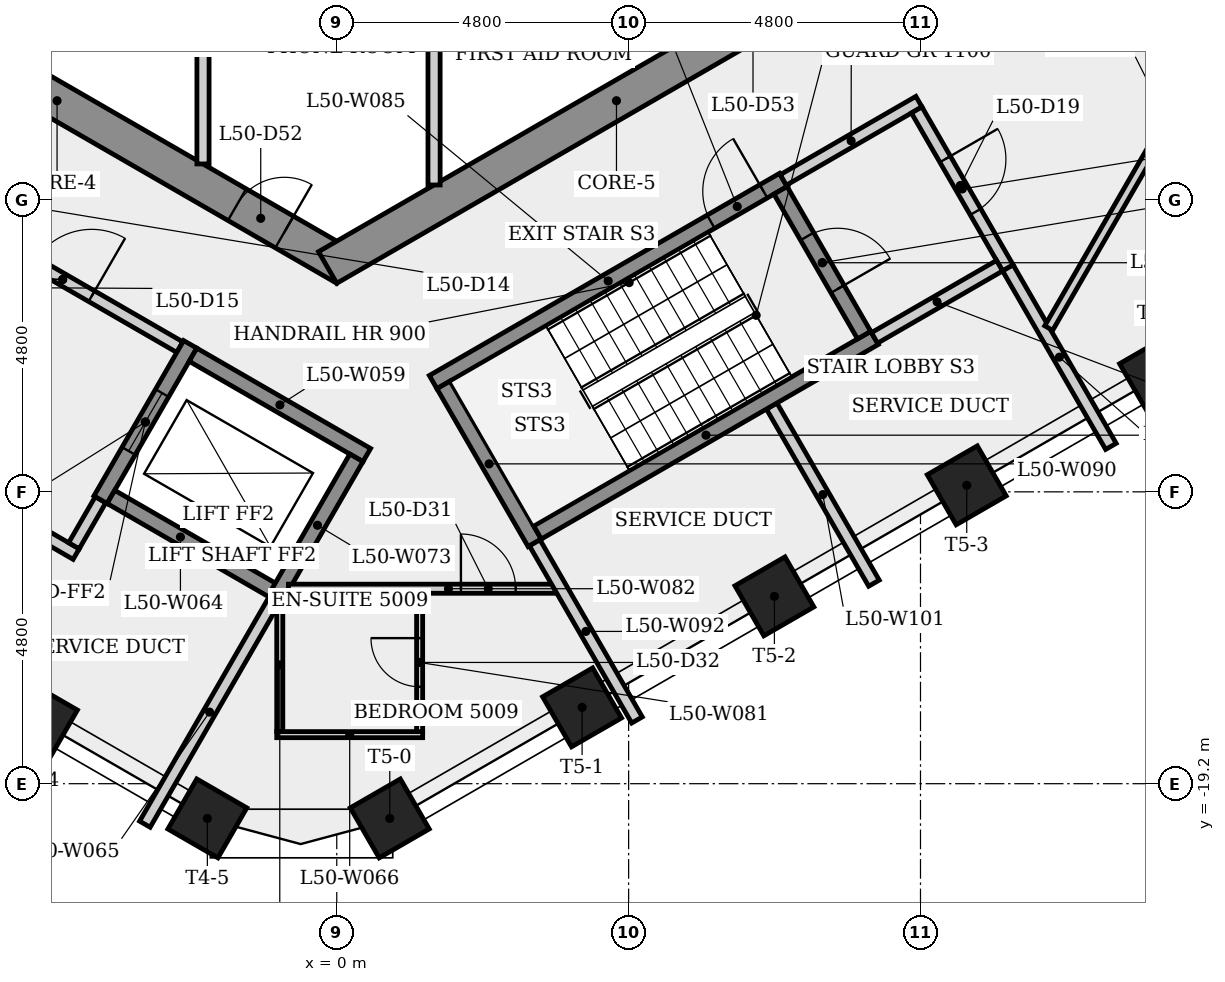
"""IFC4 building model, lengths in metres.
Left out: names, types, materials, properties, quantities, classifications, styles, units other than length and angle.
Written with IfcOpenShell. Run it as: python <this file> out.ifc"""

import sys

from ifc_helpers import new_model, si_unit, direction, frame, frame_2d, origin, origin_2d, place, context, subcontext, project, spatial, rectangle, extrude, element, fill, save


model = new_model("IFC4")
c1 = context("Model", 3, precision=1e-05, world=origin(), true_north=direction((0.0, 1.0)))
c2 = subcontext(c1, "Body", "Model", "MODEL_VIEW")
j1 = project(units=[si_unit("LENGTHUNIT", "METRE"), si_unit("PLANEANGLEUNIT", "RADIAN")], contexts=[c1])
p1 = place(None, origin())
s1 = spatial("IfcSite", under=j1, at=p1, CompositionType="ELEMENT")
p2 = place(p1, origin())
s2 = spatial("IfcBuilding", under=s1, at=p2, CompositionType="ELEMENT")
p3 = place(p2, frame((0.0, 0.0, 186.7)))
s3 = spatial("IfcBuildingStorey", under=s2, at=p3, CompositionType="ELEMENT", Elevation=186.7)
p4 = place(p3, frame((-9.35, -5.225, 0.0), z_axis=(0.0, 0.0, 1.0), x_axis=(0.866023993627, -0.500002442456, 0.0)))
e1 = element("IfcWall", 1, at=p4, inside=s3, PredefinedType="SHEAR", context=c2, shape_type="SweptSolid", body=[
    extrude(rectangle(XDim=10.97, YDim=0.6, at=frame_2d((5.485, 0.0))), origin(), (0.0, 0.0, 1.0), 4.0),
])
p5 = place(p4, frame((3.777, 0.0, 0.0)))
e2 = element("IfcOpeningElement", 2, at=p5, cuts=e1, PredefinedType="OPENING", context=c2, shape_type="SweptSolid", body=[
    extrude(rectangle(XDim=0.9, YDim=2.1, at=frame_2d((0.45, 1.05))), frame((0.0, 0.31, 0.0), z_axis=(0.0, -1.0, 0.0), x_axis=(1.0, 0.0, 0.0)), (0.0, 0.0, 1.0), 0.62),
])
p6 = place(p4, frame((8.903, 0.0, 0.0)))
e3 = element("IfcOpeningElement", 3, at=p6, cuts=e1, PredefinedType="OPENING", context=c2, shape_type="SweptSolid", body=[
    extrude(rectangle(XDim=0.9, YDim=2.1, at=frame_2d((0.45, 1.05))), frame((0.0, 0.31, 0.0), z_axis=(0.0, -1.0, 0.0), x_axis=(1.0, 0.0, 0.0)), (0.0, 0.0, 1.0), 0.62),
])
p7 = place(p3, frame((-0.15, -10.71, 0.0), z_axis=(0.0, 0.0, 1.0), x_axis=(0.866023993627, 0.500002442456, 0.0)))
e4 = element("IfcWall", 4, at=p7, inside=s3, PredefinedType="SHEAR", context=c2, shape_type="SweptSolid", body=[
    extrude(rectangle(XDim=10.97, YDim=0.6, at=frame_2d((5.485, 0.0))), origin(), (0.0, 0.0, 1.0), 4.0),
])
p8 = place(p7, frame((7.628, 0.0, 0.0)))
e5 = element("IfcOpeningElement", 5, at=p8, cuts=e4, PredefinedType="OPENING", context=c2, shape_type="SweptSolid", body=[
    extrude(rectangle(XDim=0.9, YDim=2.1, at=frame_2d((0.45, 1.05))), frame((0.0, 0.31, 0.0), z_axis=(0.0, -1.0, 0.0), x_axis=(1.0, 0.0, 0.0)), (0.0, 0.0, 1.0), 0.62),
])
for number, where, z_axis, x_axis in (
    (6, (-4.914, -18.163, 0.0), (0.0, 0.0, 1.0), (-0.5, -0.866, 0.0)),
    (7, (-2.128, -19.771, 0.0), (0.0, 0.0, 1.0), (-0.5, -0.866, 0.0)),
    (8, (0.872, -19.771, 0.0), (0.0, 0.0, 1.0), (0.5, -0.866, 0.0)),
    (9, (4.035, -17.945, 0.0), (0.0, 0.0, 1.0), (0.5, -0.866, 0.0)),
    (10, (7.198, -16.119, 0.0), (0.0, 0.0, 1.0), (0.5, -0.866, 0.0)),
    (11, (10.361, -14.293, 0.0), (0.0, 0.0, 1.0), (0.5, -0.866, 0.0)),
    (12, (13.523, -12.467, 0.0), (0.0, 0.0, 1.0), (0.5, -0.866, 0.0)),
):
    element("IfcColumn", number, at=place(p3, frame(where, z_axis=z_axis, x_axis=x_axis)), inside=s3, PredefinedType="COLUMN", context=c2, shape_type="SweptSolid", body=[
        extrude(rectangle(XDim=0.95, YDim=0.95, at=origin_2d()), origin(), (0.0, 0.0, 1.0), 4.0),
    ])
p9 = place(p3, frame((-8.356, -13.073, 0.0), z_axis=(0.0, 0.0, 1.0), x_axis=(0.866038532462, -0.499977259774, 0.0)))
e13 = element("IfcWall", 13, at=p9, inside=s3, PredefinedType="PLUMBINGWALL", context=c2, shape_type="SweptSolid", body=[
    extrude(rectangle(XDim=4.7, YDim=0.2, at=frame_2d((2.35, 0.0))), origin(), (0.0, 0.0, 1.0), 3.6),
])
p10 = place(p3, frame((-6.435, -9.795, 0.0), z_axis=(0.0, 0.0, 1.0), x_axis=(0.866012907634, -0.500021643343, 0.0)))
e14 = element("IfcWall", 14, at=p10, inside=s3, PredefinedType="PARTITIONING", context=c2, shape_type="SweptSolid", body=[
    extrude(rectangle(XDim=4.45, YDim=0.2, at=frame_2d((2.225, 0.0))), origin(), (0.0, 0.0, 1.0), 3.6),
])
p11 = place(p10, frame((1.675, 0.0, 0.0)))
e15 = element("IfcOpeningElement", 15, at=p11, cuts=e14, PredefinedType="OPENING", context=c2, shape_type="SweptSolid", body=[
    extrude(rectangle(XDim=1.1, YDim=2.1, at=frame_2d((0.55, 1.05))), frame((0.0, 0.11, 0.0), z_axis=(0.0, -1.0, 0.0), x_axis=(1.0, 0.0, 0.0)), (0.0, 0.0, 1.0), 0.22),
])
p12 = place(p3, frame((-3.885, -14.529, 0.0), z_axis=(0.0, 0.0, 1.0), x_axis=(-0.499859285417, -0.866106630146, 0.0)))
e16 = element("IfcWall", 16, at=p12, inside=s3, PredefinedType="PLUMBINGWALL", context=c2, shape_type="SweptSolid", body=[
    extrude(rectangle(XDim=0.875, YDim=0.2, at=frame_2d((0.438, 0.0))), origin(), (0.0, 0.0, 1.0), 3.6),
])
p13 = place(p3, frame((-2.41, -11.974, 0.0), z_axis=(0.0, 0.0, 1.0), x_axis=(-0.500001826776, -0.866024349092, 0.0)))
e17 = element("IfcWall", 17, at=p13, inside=s3, PredefinedType="SHEAR", context=c2, shape_type="SweptSolid", body=[
    extrude(rectangle(XDim=2.95, YDim=0.25, at=frame_2d((1.475, 0.0))), origin(), (0.0, 0.0, 1.0), 3.6),
])
p14 = place(p13, frame((0.925, 0.0, 0.0)))
e18 = element("IfcOpeningElement", 18, at=p14, cuts=e17, PredefinedType="OPENING", context=c2, shape_type="SweptSolid", body=[
    extrude(rectangle(XDim=1.1, YDim=2.1, at=frame_2d((0.55, 1.05))), frame((0.0, 0.135, 0.0), z_axis=(0.0, -1.0, 0.0), x_axis=(1.0, 0.0, 0.0)), (0.0, 0.0, 1.0), 0.27),
])
p15 = place(p3, frame((-2.364, -12.145, 0.0), z_axis=(0.0, 0.0, 1.0), x_axis=(0.866040211805, -0.499974350878, 0.0)))
e19 = element("IfcWall", 19, at=p15, inside=s3, PredefinedType="SHEAR", context=c2, shape_type="SweptSolid", body=[
    extrude(rectangle(XDim=3.3, YDim=0.25, at=frame_2d((1.65, 0.0))), origin(), (0.0, 0.0, 1.0), 3.6),
])
p16 = place(p3, frame((-2.2, -5.25, 0.0), z_axis=(0.0, 0.0, 1.0), x_axis=(0.0, -1.0, 0.0)))
e20 = element("IfcWall", 20, at=p16, inside=s3, PredefinedType="PARTITIONING", context=c2, shape_type="SweptSolid", body=[
    extrude(rectangle(XDim=3.757, YDim=0.2, at=frame_2d((1.878, 0.0))), origin(), (0.0, 0.0, 1.0), 3.6),
])
p17 = place(p3, frame((-0.856, -16.133, 0.0), z_axis=(0.0, 0.0, 1.0), x_axis=(-0.866021716278, 0.500006386895, 0.0)))
e21 = element("IfcWall", 21, at=p17, inside=s3, PredefinedType="SHEAR", context=c2, shape_type="SweptSolid", body=[
    extrude(rectangle(XDim=3.3, YDim=0.25, at=frame_2d((1.65, 0.0))), origin(), (0.0, 0.0, 1.0), 3.6),
])
p18 = place(p3, frame((-1.027, -16.179, 0.0), z_axis=(0.0, 0.0, 1.0), x_axis=(-0.500011993549, -0.866018479195, 0.0)))
e22 = element("IfcWall", 22, at=p18, inside=s3, PredefinedType="PLUMBINGWALL", context=c2, shape_type="SweptSolid", body=[
    extrude(rectangle(XDim=4.258, YDim=0.2, at=frame_2d((2.129, 0.0))), origin(), (0.0, 0.0, 1.0), 3.6),
])
p19 = place(p3, frame((-0.987, -18.393, 0.0), z_axis=(0.0, 0.0, 1.0), x_axis=(1.0, 0.0, 0.0)))
e23 = element("IfcWall", 23, at=p19, inside=s3, PredefinedType="PARTITIONING", context=c2, shape_type="SweptSolid", body=[
    extrude(rectangle(XDim=2.4, YDim=0.1, at=frame_2d((1.2, 0.0))), origin(), (0.0, 0.0, 1.0), 3.6),
])
p20 = place(p3, frame((-0.937, -16.148, 0.0), z_axis=(0.0, 0.0, 1.0), x_axis=(0.0, -1.0, 0.0)))
e24 = element("IfcWall", 24, at=p20, inside=s3, PredefinedType="PARTITIONING", context=c2, shape_type="SweptSolid", body=[
    extrude(rectangle(XDim=2.195, YDim=0.1, at=frame_2d((1.098, 0.0))), origin(), (0.0, 0.0, 1.0), 3.6),
])
p21 = place(p3, frame((0.323, -13.841, 0.0), z_axis=(0.0, 0.0, 1.0), x_axis=(-0.500066320839, -0.865987110044, 0.0)))
e25 = element("IfcWall", 25, at=p21, inside=s3, PredefinedType="SHEAR", context=c2, shape_type="SweptSolid", body=[
    extrude(rectangle(XDim=2.561, YDim=0.25, at=frame_2d((1.28, 0.0))), origin(), (0.0, 0.0, 1.0), 4.0),
])
p22 = place(p3, frame((1.363, -18.343, 0.0), z_axis=(0.0, 0.0, 1.0), x_axis=(0.0, 1.0, 0.0)))
e26 = element("IfcWall", 26, at=p22, inside=s3, PredefinedType="PARTITIONING", context=c2, shape_type="SweptSolid", body=[
    extrude(rectangle(XDim=2.275, YDim=0.1, at=frame_2d((1.137, 0.0))), origin(), (0.0, 0.0, 1.0), 3.6),
])
p23 = place(p22, frame((0.738, 0.0, 0.0)))
e27 = element("IfcOpeningElement", 27, at=p23, cuts=e26, PredefinedType="OPENING", context=c2, shape_type="SweptSolid", body=[
    extrude(rectangle(XDim=0.8, YDim=2.1, at=frame_2d((0.4, 1.05))), frame((0.0, 0.06, 0.0), z_axis=(0.0, -1.0, 0.0), x_axis=(1.0, 0.0, 0.0)), (0.0, 0.0, 1.0), 0.12),
])
p24 = place(p3, frame((-0.795, -15.993, 0.0), z_axis=(0.0, 0.0, 1.0), x_axis=(1.0, 0.0, 0.0)))
e28 = element("IfcWall", 28, at=p24, inside=s3, PredefinedType="PARTITIONING", context=c2, shape_type="SweptSolid", body=[
    extrude(rectangle(XDim=4.386, YDim=0.15, at=frame_2d((2.193, 0.0))), origin(), (0.0, 0.0, 1.0), 3.6),
])
p25 = place(p24, frame((2.837, 0.0, 0.0)))
e29 = element("IfcOpeningElement", 29, at=p25, cuts=e28, PredefinedType="OPENING", context=c2, shape_type="SweptSolid", body=[
    extrude(rectangle(XDim=0.9, YDim=2.1, at=frame_2d((0.45, 1.05))), frame((0.0, 0.085, 0.0), z_axis=(0.0, -1.0, 0.0), x_axis=(1.0, 0.0, 0.0)), (0.0, 0.0, 1.0), 0.17),
])
p26 = place(p3, frame((1.6, -5.25, 0.0), z_axis=(0.0, 0.0, 1.0), x_axis=(0.0, -1.0, 0.0)))
e30 = element("IfcWall", 30, at=p26, inside=s3, PredefinedType="PARTITIONING", context=c2, shape_type="SweptSolid", body=[
    extrude(rectangle(XDim=4.103, YDim=0.2, at=frame_2d((2.052, 0.0))), origin(), (0.0, 0.0, 1.0), 3.6),
])
p27 = place(p3, frame((1.585, -12.595, 0.0), z_axis=(0.0, 0.0, 1.0), x_axis=(0.866036417653, 0.499980922934, 0.0)))
e31 = element("IfcWall", 31, at=p27, inside=s3, PredefinedType="SHEAR", context=c2, shape_type="SweptSolid", body=[
    extrude(rectangle(XDim=6.65, YDim=0.25, at=frame_2d((3.325, 0.0))), origin(), (0.0, 0.0, 1.0), 3.6),
])
p28 = place(p27, frame((5.275, 0.0, 0.0)))
e32 = element("IfcOpeningElement", 32, at=p28, cuts=e31, PredefinedType="OPENING", context=c2, shape_type="SweptSolid", body=[
    extrude(rectangle(XDim=1.0, YDim=2.1, at=frame_2d((0.5, 1.05))), frame((0.0, 0.135, 0.0), z_axis=(0.0, -1.0, 0.0), x_axis=(1.0, 0.0, 0.0)), (0.0, 0.0, 1.0), 0.27),
])
p29 = place(p3, frame((3.256, -15.239, 0.0), z_axis=(0.0, 0.0, 1.0), x_axis=(-0.50002537861, 0.866010750942, 0.0)))
e33 = element("IfcWall", 33, at=p29, inside=s3, PredefinedType="SHEAR", context=c2, shape_type="SweptSolid", body=[
    extrude(rectangle(XDim=3.0, YDim=0.25, at=frame_2d((1.5, 0.0))), origin(), (0.0, 0.0, 1.0), 3.6),
])
for number, where, z_axis, x_axis in (
    (34, (3.256, -15.239, 0.0), (0.0, 0.0, 1.0), (0.5, -0.866, 0.0)),
    (35, (7.153, -12.989, 0.0), (0.0, 0.0, 1.0), (0.5, -0.866, 0.0)),
):
    element("IfcWall", number, at=place(p3, frame(where, z_axis=z_axis, x_axis=x_axis)), inside=s3, PredefinedType="PLUMBINGWALL", context=c2, shape_type="SweptSolid", body=[
        extrude(rectangle(XDim=3.364, YDim=0.2, at=frame_2d((1.682, 0.0))), origin(), (0.0, 0.0, 1.0), 3.6),
    ])
p30 = place(p3, frame((3.301, -15.068, 0.0), z_axis=(0.0, 0.0, 1.0), x_axis=(0.866035036182, 0.499983315828, 0.0)))
e36 = element("IfcWall", 36, at=p30, inside=s3, PredefinedType="SHEAR", context=c2, shape_type="SweptSolid", body=[
    extrude(rectangle(XDim=6.4, YDim=0.25, at=frame_2d((3.2, 0.0))), origin(), (0.0, 0.0, 1.0), 4.0),
])
p31 = place(p3, frame((7.298, -9.441, 0.0), z_axis=(0.0, 0.0, 1.0), x_axis=(0.500034990121, -0.866005201286, 0.0)))
e37 = element("IfcWall", 37, at=p31, inside=s3, PredefinedType="SHEAR", context=c2, shape_type="SweptSolid", body=[
    extrude(rectangle(XDim=2.75, YDim=0.25, at=frame_2d((1.375, 0.0))), origin(), (0.0, 0.0, 1.0), 3.6),
])
p32 = place(p31, frame((0.875, 0.0, 0.0)))
e38 = element("IfcOpeningElement", 38, at=p32, cuts=e37, PredefinedType="OPENING", context=c2, shape_type="SweptSolid", body=[
    extrude(rectangle(XDim=1.0, YDim=2.1, at=frame_2d((0.5, 1.05))), frame((0.0, 0.135, 0.0), z_axis=(0.0, -1.0, 0.0), x_axis=(1.0, 0.0, 0.0)), (0.0, 0.0, 1.0), 0.27),
])
p33 = place(p3, frame((7.344, -9.27, 0.0), z_axis=(0.0, 0.0, 1.0), x_axis=(0.866005588531, 0.500034319456, 0.0)))
e39 = element("IfcWall", 39, at=p33, inside=s3, PredefinedType="PARTITIONING", context=c2, shape_type="SweptSolid", body=[
    extrude(rectangle(XDim=2.575, YDim=0.2, at=frame_2d((1.288, 0.0))), origin(), (0.0, 0.0, 1.0), 3.6),
])
p34 = place(p3, frame((9.537, -8.119, 0.0), z_axis=(0.0, 0.0, 1.0), x_axis=(0.499990139034, -0.866031096941, 0.0)))
e40 = element("IfcWall", 40, at=p34, inside=s3, PredefinedType="PARTITIONING", context=c2, shape_type="SweptSolid", body=[
    extrude(rectangle(XDim=3.0, YDim=0.2, at=frame_2d((1.5, 0.0))), origin(), (0.0, 0.0, 1.0), 3.6),
])
p35 = place(p34, frame((0.935, 0.0, 0.0)))
e41 = element("IfcOpeningElement", 41, at=p35, cuts=e40, PredefinedType="OPENING", context=c2, shape_type="SweptSolid", body=[
    extrude(rectangle(XDim=1.0, YDim=2.1, at=frame_2d((0.5, 1.05))), frame((0.0, 0.11, 0.0), z_axis=(0.0, -1.0, 0.0), x_axis=(1.0, 0.0, 0.0)), (0.0, 0.0, 1.0), 0.22),
])
p36 = place(p3, frame((10.901, -10.681, 0.0), z_axis=(0.0, 0.0, 1.0), x_axis=(-0.866007538022, -0.500030943131, 0.0)))
e42 = element("IfcWall", 42, at=p36, inside=s3, PredefinedType="PLUMBINGWALL", context=c2, shape_type="SweptSolid", body=[
    extrude(rectangle(XDim=2.375, YDim=0.2, at=frame_2d((1.188, 0.0))), origin(), (0.0, 0.0, 1.0), 3.6),
])
p37 = place(p3, frame((11.037, -10.717, 0.0), z_axis=(0.0, 0.0, 1.0), x_axis=(0.499982299553, -0.866035622901, 0.0)))
e43 = element("IfcWall", 43, at=p37, inside=s3, PredefinedType="PLUMBINGWALL", context=c2, shape_type="SweptSolid", body=[
    extrude(rectangle(XDim=3.389, YDim=0.2, at=frame_2d((1.694, 0.0))), origin(), (0.0, 0.0, 1.0), 3.6),
])
p38 = place(p3, frame((15.63, -4.915, 0.0), z_axis=(0.0, 0.0, 1.0), x_axis=(-0.499989217622, -0.866031628904, 0.0)))
e44 = element("IfcWall", 44, at=p38, inside=s3, PredefinedType="PARTITIONING", context=c2, shape_type="SweptSolid", body=[
    extrude(rectangle(XDim=7.843, YDim=0.15, at=frame_2d((3.921, 0.0))), origin(), (0.0, 0.0, 1.0), 3.6),
])
p39 = place(p38, frame((3.421, 0.0, 0.0)))
e45 = element("IfcOpeningElement", 45, at=p39, cuts=e44, PredefinedType="OPENING", context=c2, shape_type="SweptSolid", body=[
    extrude(rectangle(XDim=1.0, YDim=2.1, at=frame_2d((0.5, 1.05))), frame((0.0, 0.085, 0.0), z_axis=(0.0, -1.0, 0.0), x_axis=(1.0, 0.0, 0.0)), (0.0, 0.0, 1.0), 0.17),
])
p40 = place(p11, origin())
e46 = element("IfcDoor", 46, at=p40, inside=s3, OperationType="SINGLE_SWING_RIGHT", PredefinedType="DOOR", context=c2, shape_type="SweptSolid", body=[
    extrude(rectangle(XDim=1.1, YDim=2.1, at=frame_2d((0.55, 1.05))), frame((0.0, 0.025, 0.0), z_axis=(0.0, -1.0, 0.0), x_axis=(1.0, 0.0, 0.0)), (0.0, 0.0, 1.0), 0.05),
])
fill(e15, e46)
p41 = place(p14, origin())
e47 = element("IfcDoor", 47, at=p41, inside=s3, OperationType="SLIDING_TO_LEFT", PredefinedType="DOOR", context=c2, shape_type="SweptSolid", body=[
    extrude(rectangle(XDim=1.1, YDim=2.1, at=frame_2d((0.55, 1.05))), frame((0.0, 0.025, 0.0), z_axis=(0.0, -1.0, 0.0), x_axis=(1.0, 0.0, 0.0)), (0.0, 0.0, 1.0), 0.05),
])
fill(e18, e47)
p42 = place(p28, origin())
e48 = element("IfcDoor", 48, at=p42, inside=s3, OperationType="SINGLE_SWING_RIGHT", PredefinedType="DOOR", context=c2, shape_type="SweptSolid", body=[
    extrude(rectangle(XDim=1.0, YDim=2.1, at=frame_2d((0.5, 1.05))), frame((0.0, 0.025, 0.0), z_axis=(0.0, -1.0, 0.0), x_axis=(1.0, 0.0, 0.0)), (0.0, 0.0, 1.0), 0.05),
])
fill(e32, e48)
p43 = place(p35, origin())
e49 = element("IfcDoor", 49, at=p43, inside=s3, OperationType="SINGLE_SWING_LEFT", PredefinedType="DOOR", context=c2, shape_type="SweptSolid", body=[
    extrude(rectangle(XDim=1.0, YDim=2.1, at=frame_2d((0.5, 1.05))), frame((0.0, 0.025, 0.0), z_axis=(0.0, -1.0, 0.0), x_axis=(1.0, 0.0, 0.0)), (0.0, 0.0, 1.0), 0.05),
])
fill(e41, e49)
p44 = place(p32, origin())
e50 = element("IfcDoor", 50, at=p44, inside=s3, OperationType="SINGLE_SWING_RIGHT", PredefinedType="DOOR", context=c2, shape_type="SweptSolid", body=[
    extrude(rectangle(XDim=1.0, YDim=2.1, at=frame_2d((0.5, 1.05))), frame((0.0, 0.025, 0.0), z_axis=(0.0, -1.0, 0.0), x_axis=(1.0, 0.0, 0.0)), (0.0, 0.0, 1.0), 0.05),
])
fill(e38, e50)
p45 = place(p25, origin())
e51 = element("IfcDoor", 51, at=p45, inside=s3, OperationType="SINGLE_SWING_LEFT", PredefinedType="DOOR", context=c2, shape_type="SweptSolid", body=[
    extrude(rectangle(XDim=0.9, YDim=2.1, at=frame_2d((0.45, 1.05))), frame((0.0, 0.025, 0.0), z_axis=(0.0, -1.0, 0.0), x_axis=(1.0, 0.0, 0.0)), (0.0, 0.0, 1.0), 0.05),
])
fill(e29, e51)
p46 = place(p23, origin())
e52 = element("IfcDoor", 52, at=p46, inside=s3, OperationType="SINGLE_SWING_RIGHT", PredefinedType="DOOR", context=c2, shape_type="SweptSolid", body=[
    extrude(rectangle(XDim=0.8, YDim=2.1, at=frame_2d((0.4, 1.05))), frame((0.0, 0.025, 0.0), z_axis=(0.0, -1.0, 0.0), x_axis=(1.0, 0.0, 0.0)), (0.0, 0.0, 1.0), 0.05),
])
fill(e27, e52)
p47 = place(p6, origin())
e53 = element("IfcDoor", 53, at=p47, inside=s3, OperationType="SINGLE_SWING_RIGHT", PredefinedType="DOOR", context=c2, shape_type="SweptSolid", body=[
    extrude(rectangle(XDim=0.9, YDim=2.1, at=frame_2d((0.45, 1.05))), frame((0.0, 0.025, 0.0), z_axis=(0.0, -1.0, 0.0), x_axis=(1.0, 0.0, 0.0)), (0.0, 0.0, 1.0), 0.05),
])
fill(e3, e53)
save(model, sys.argv[1])
